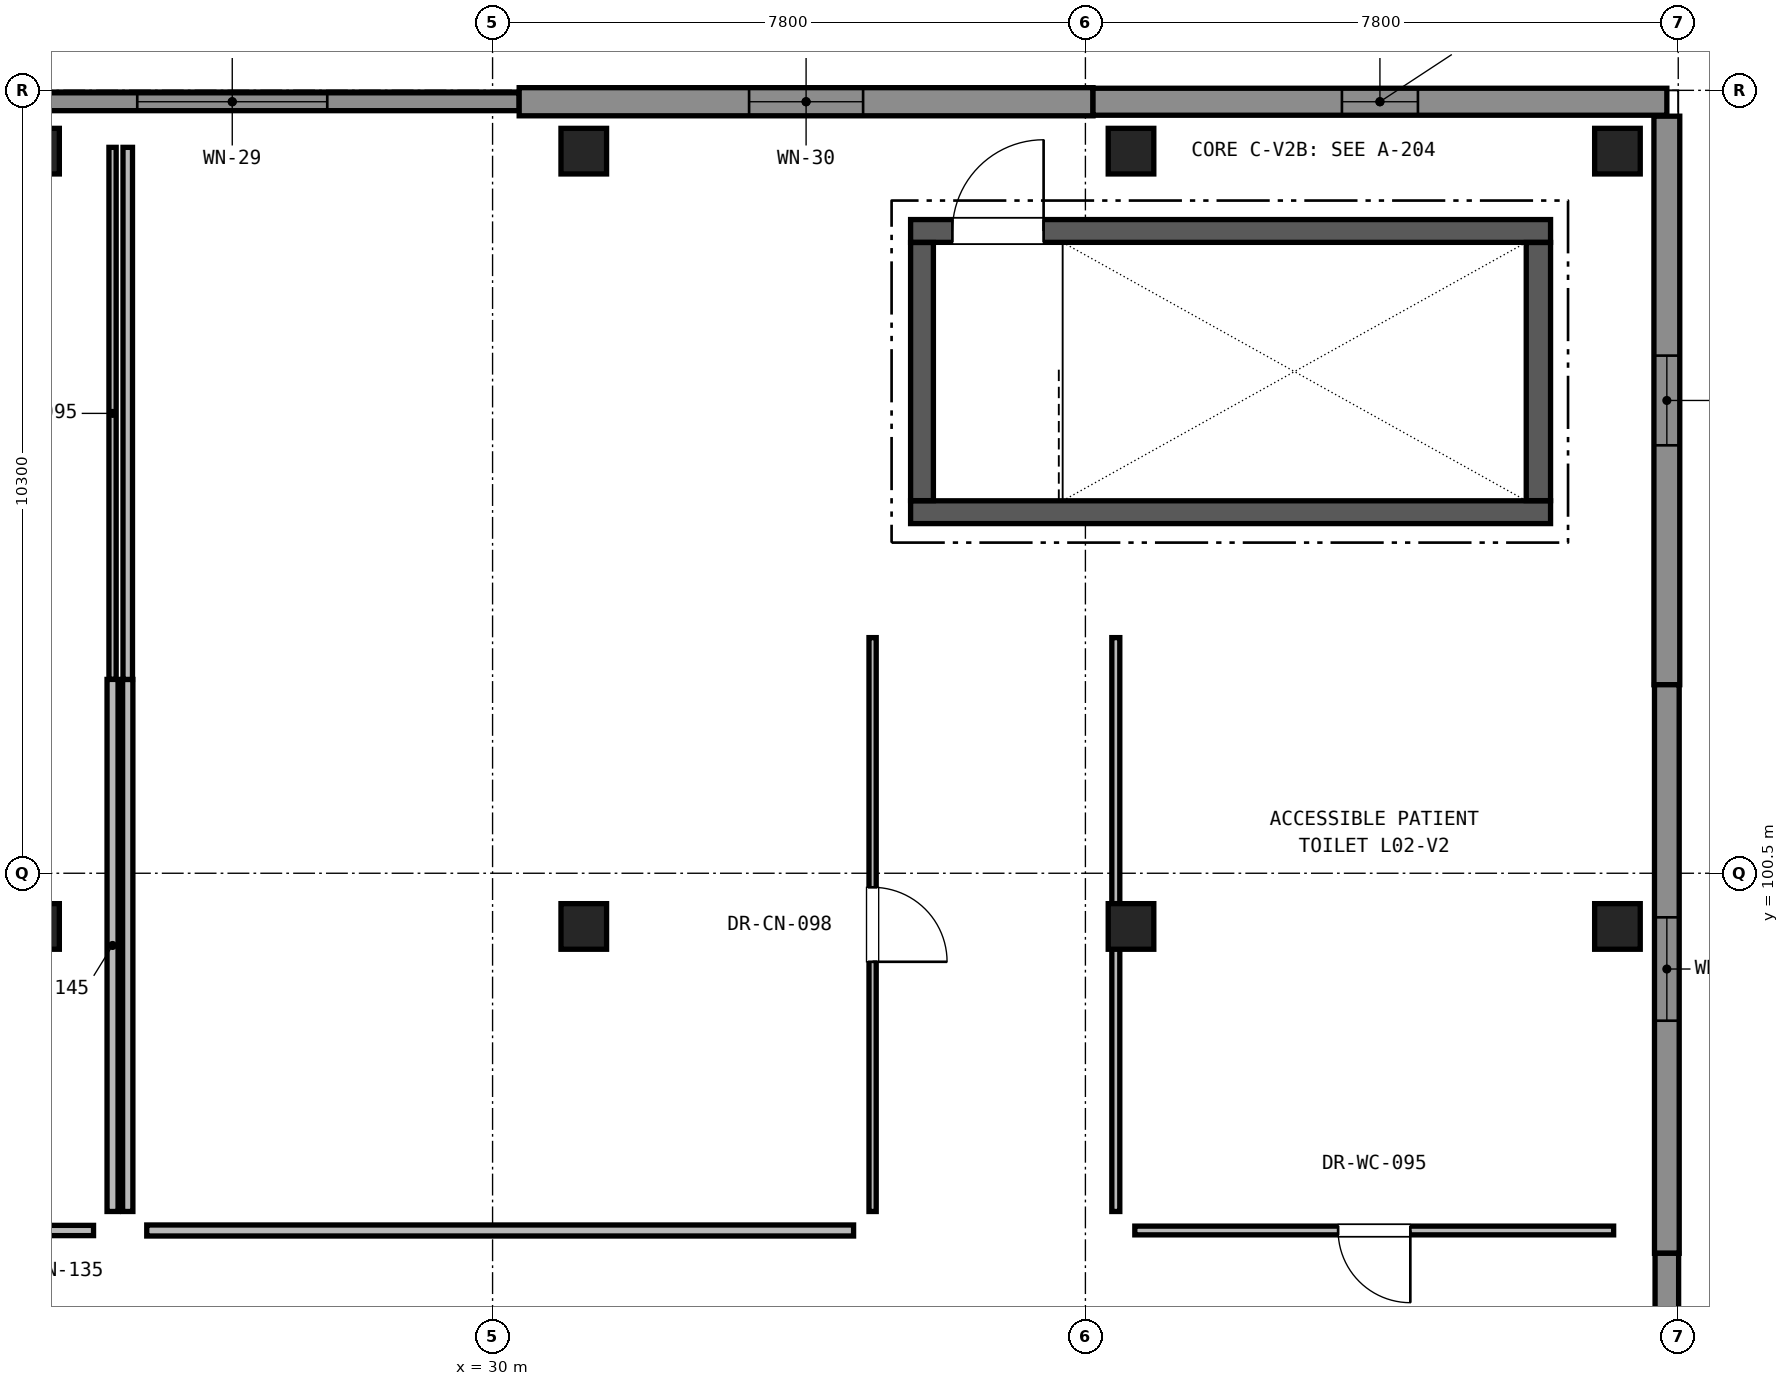
"""IFC4 building model, lengths in metres.
Left out: names, types, materials, properties, quantities, classifications, styles, units other than length and angle.
Written with IfcOpenShell. Run it as: python <this file> out.ifc"""

import sys

from ifc_helpers import new_model, si_unit, direction, frame, frame_2d, origin, origin_2d, place, context, subcontext, project, spatial, rectangle, extrude, element, fill, save


model = new_model("IFC4")
c1 = context("Model", 3, precision=1e-05, world=origin(), true_north=direction((0.0, 1.0)))
c2 = subcontext(c1, "Body", "Model", "MODEL_VIEW")
j1 = project(units=[si_unit("LENGTHUNIT", "METRE"), si_unit("PLANEANGLEUNIT", "RADIAN")], contexts=[c1])
p1 = place(None, origin())
s1 = spatial("IfcSite", under=j1, at=p1, CompositionType="ELEMENT")
p2 = place(p1, origin())
s2 = spatial("IfcBuilding", under=s1, at=p2, CompositionType="ELEMENT")
p3 = place(p2, frame((0.0, 0.0, 9.52)))
s3 = spatial("IfcBuildingStorey", under=s2, at=p3, CompositionType="ELEMENT", Elevation=9.52)
for number, where, z_axis, x_axis in (
    (1, (24.0, 99.8, 0.0), (0.0, 0.0, 1.0), (1.0, 0.0, 0.0)),
    (2, (24.0, 110.0, 0.0), (0.0, 0.0, 1.0), (1.0, 0.0, 0.0)),
    (3, (31.2, 99.8, 0.0), (0.0, 0.0, 1.0), (1.0, 0.0, 0.0)),
    (4, (31.2, 110.0, 0.0), (0.0, 0.0, 1.0), (1.0, 0.0, 0.0)),
    (5, (38.4, 99.8, 0.0), (0.0, 0.0, 1.0), (1.0, 0.0, 0.0)),
    (6, (38.4, 110.0, 0.0), (0.0, 0.0, 1.0), (1.0, 0.0, 0.0)),
    (7, (44.8, 99.8, 0.0), (0.0, 0.0, 1.0), (1.0, 0.0, 0.0)),
    (8, (44.8, 110.0, 0.0), (0.0, 0.0, 1.0), (1.0, 0.0, 0.0)),
):
    element("IfcColumn", number, at=place(p3, frame(where, z_axis=z_axis, x_axis=x_axis)), inside=s3, PredefinedType="COLUMN", context=c2, shape_type="SweptSolid", body=[
        extrude(rectangle(XDim=0.6, YDim=0.6, at=origin_2d()), origin(), (0.0, 0.0, 1.0), 4.08),
    ])
p4 = place(p3, frame((22.8, 110.65, 0.0), z_axis=(0.0, 0.0, 1.0), x_axis=(1.0, 0.0, 0.0)))
e9 = element("IfcWall", 9, at=p4, inside=s3, PredefinedType="SOLIDWALL", context=c2, shape_type="SweptSolid", body=[
    extrude(rectangle(XDim=7.55, YDim=0.235, at=frame_2d((3.775, 0.0))), origin(), (0.0, 0.0, 1.0), 3.843),
])
p5 = place(p4, frame((2.525, 0.0, 0.9)))
e10 = element("IfcOpeningElement", 10, at=p5, cuts=e9, PredefinedType="OPENING", context=c2, shape_type="SweptSolid", body=[
    extrude(rectangle(XDim=2.5, YDim=2.0, at=frame_2d((1.25, 1.0))), frame((0.0, 0.127, 0.0), z_axis=(0.0, -1.0, 0.0), x_axis=(1.0, 0.0, 0.0)), (0.0, 0.0, 1.0), 0.255),
])
p6 = place(p3, frame((30.35, 110.65, 0.0), z_axis=(0.0, 0.0, 1.0), x_axis=(1.0, 0.0, 0.0)))
e11 = element("IfcWall", 11, at=p6, inside=s3, PredefinedType="SOLIDWALL", context=c2, shape_type="SweptSolid", body=[
    extrude(rectangle(XDim=7.55, YDim=0.37, at=frame_2d((3.775, 0.0))), origin(), (0.0, 0.0, 1.0), 3.843),
])
p7 = place(p6, frame((3.025, 0.0, 0.9)))
e12 = element("IfcOpeningElement", 12, at=p7, cuts=e11, PredefinedType="OPENING", context=c2, shape_type="SweptSolid", body=[
    extrude(rectangle(XDim=1.5, YDim=2.2, at=frame_2d((0.75, 1.1))), frame((0.0, 0.195, 0.0), z_axis=(0.0, -1.0, 0.0), x_axis=(1.0, 0.0, 0.0)), (0.0, 0.0, 1.0), 0.39),
])
p8 = place(p3, frame((37.9, 110.65, 0.0), z_axis=(0.0, 0.0, 1.0), x_axis=(1.0, 0.0, 0.0)))
e13 = element("IfcWall", 13, at=p8, inside=s3, PredefinedType="SOLIDWALL", context=c2, shape_type="SweptSolid", body=[
    extrude(rectangle(XDim=7.55, YDim=0.355, at=frame_2d((3.775, 0.0))), origin(), (0.0, 0.0, 1.0), 3.843),
])
p9 = place(p8, frame((3.275, 0.0, 0.9)))
e14 = element("IfcOpeningElement", 14, at=p9, cuts=e13, PredefinedType="OPENING", context=c2, shape_type="SweptSolid", body=[
    extrude(rectangle(XDim=1.0, YDim=1.62, at=frame_2d((0.5, 0.81))), frame((0.0, 0.188, 0.0), z_axis=(0.0, -1.0, 0.0), x_axis=(1.0, 0.0, 0.0)), (0.0, 0.0, 1.0), 0.375),
])
p10 = place(p3, frame((45.45, 110.46, 0.0), z_axis=(0.0, 0.0, 1.0), x_axis=(0.0, -1.0, 0.0)))
e15 = element("IfcWall", 15, at=p10, inside=s3, PredefinedType="SOLIDWALL", context=c2, shape_type="SweptSolid", body=[
    extrude(rectangle(XDim=7.48, YDim=0.34, at=frame_2d((3.74, 0.0))), origin(), (0.0, 0.0, 1.0), 3.843),
])
p11 = place(p10, frame((3.15, 0.0, 0.9)))
e16 = element("IfcOpeningElement", 16, at=p11, cuts=e15, PredefinedType="OPENING", context=c2, shape_type="SweptSolid", body=[
    extrude(rectangle(XDim=1.18, YDim=1.62, at=frame_2d((0.59, 0.81))), frame((0.0, 0.18, 0.0), z_axis=(0.0, -1.0, 0.0), x_axis=(1.0, 0.0, 0.0)), (0.0, 0.0, 1.0), 0.36),
])
p12 = place(p3, frame((45.45, 102.98, 0.0), z_axis=(0.0, 0.0, 1.0), x_axis=(0.0, -1.0, 0.0)))
e17 = element("IfcWall", 17, at=p12, inside=s3, PredefinedType="SOLIDWALL", context=c2, shape_type="SweptSolid", body=[
    extrude(rectangle(XDim=7.48, YDim=0.325, at=frame_2d((3.74, 0.0))), origin(), (0.0, 0.0, 1.0), 3.843),
])
p13 = place(p12, frame((3.06, 0.0, 0.9)))
e18 = element("IfcOpeningElement", 18, at=p13, cuts=e17, PredefinedType="OPENING", context=c2, shape_type="SweptSolid", body=[
    extrude(rectangle(XDim=1.36, YDim=1.62, at=frame_2d((0.68, 0.81))), frame((0.0, 0.172, 0.0), z_axis=(0.0, -1.0, 0.0), x_axis=(1.0, 0.0, 0.0)), (0.0, 0.0, 1.0), 0.345),
])
p14 = place(p3, frame((45.45, 95.5, 0.0), z_axis=(0.0, 0.0, 1.0), x_axis=(0.0, -1.0, 0.0)))
e19 = element("IfcWall", 19, at=p14, inside=s3, PredefinedType="SOLIDWALL", context=c2, shape_type="SweptSolid", body=[
    extrude(rectangle(XDim=7.48, YDim=0.31, at=frame_2d((3.74, 0.0))), origin(), (0.0, 0.0, 1.0), 3.843),
])
p15 = place(p14, frame((2.97, 0.0, 0.9)))
e20 = element("IfcOpeningElement", 20, at=p15, cuts=e19, PredefinedType="OPENING", context=c2, shape_type="SweptSolid", body=[
    extrude(rectangle(XDim=1.54, YDim=1.62, at=frame_2d((0.77, 0.81))), frame((0.0, 0.165, 0.0), z_axis=(0.0, -1.0, 0.0), x_axis=(1.0, 0.0, 0.0)), (0.0, 0.0, 1.0), 0.33),
])
p16 = place(p3, frame((35.5, 105.25, 0.0), z_axis=(0.0, 0.0, 1.0), x_axis=(1.0, 0.0, 0.0)))
e21 = element("IfcWall", 21, at=p16, inside=s3, PredefinedType="SHEAR", context=c2, shape_type="SweptSolid", body=[
    extrude(rectangle(XDim=8.42, YDim=0.3, at=frame_2d((4.21, 0.0))), origin(), (0.0, 0.0, 1.0), 3.843),
])
p17 = place(p3, frame((35.5, 108.95, 0.0), z_axis=(0.0, 0.0, 1.0), x_axis=(1.0, 0.0, 0.0)))
e22 = element("IfcWall", 22, at=p17, inside=s3, PredefinedType="SHEAR", context=c2, shape_type="SweptSolid", body=[
    extrude(rectangle(XDim=8.42, YDim=0.3, at=frame_2d((4.21, 0.0))), origin(), (0.0, 0.0, 1.0), 3.843),
])
p18 = place(p17, frame((0.55, 0.0, 0.0)))
e23 = element("IfcOpeningElement", 23, at=p18, cuts=e22, PredefinedType="OPENING", context=c2, shape_type="SweptSolid", body=[
    extrude(rectangle(XDim=1.2, YDim=2.2, at=frame_2d((0.6, 1.1))), frame((0.0, 0.16, 0.0), z_axis=(0.0, -1.0, 0.0), x_axis=(1.0, 0.0, 0.0)), (0.0, 0.0, 1.0), 0.32),
])
p19 = place(p3, frame((35.65, 105.402, 0.0), z_axis=(0.0, 0.0, 1.0), x_axis=(0.0, 1.0, 0.0)))
e24 = element("IfcWall", 24, at=p19, inside=s3, PredefinedType="SHEAR", context=c2, shape_type="SweptSolid", body=[
    extrude(rectangle(XDim=3.396, YDim=0.3, at=frame_2d((1.698, 0.0))), origin(), (0.0, 0.0, 1.0), 3.843),
])
p20 = place(p3, frame((43.76, 105.402, 0.0), z_axis=(0.0, 0.0, 1.0), x_axis=(0.0, 1.0, 0.0)))
e25 = element("IfcWall", 25, at=p20, inside=s3, PredefinedType="SHEAR", context=c2, shape_type="SweptSolid", body=[
    extrude(rectangle(XDim=3.396, YDim=0.32, at=frame_2d((1.698, 0.0))), origin(), (0.0, 0.0, 1.0), 3.843),
])
p21 = place(p3, frame((25.0, 110.05, 0.0), z_axis=(0.0, 0.0, 1.0), x_axis=(0.0, -1.0, 0.0)))
e26 = element("IfcWall", 26, at=p21, inside=s3, PredefinedType="PARTITIONING", context=c2, shape_type="SweptSolid", body=[
    extrude(rectangle(XDim=7.0, YDim=0.095, at=frame_2d((3.5, 0.0))), origin(), (0.0, 0.0, 1.0), 3.143),
])
p22 = place(p3, frame((25.0, 103.05, 0.0), z_axis=(0.0, 0.0, 1.0), x_axis=(0.0, -1.0, 0.0)))
e27 = element("IfcWall", 27, at=p22, inside=s3, PredefinedType="PARTITIONING", context=c2, shape_type="SweptSolid", body=[
    extrude(rectangle(XDim=7.0, YDim=0.145, at=frame_2d((3.5, 0.0))), origin(), (0.0, 0.0, 1.0), 3.043),
])
p23 = place(p3, frame((24.75, 95.8, 0.0), z_axis=(0.0, 0.0, 1.0), x_axis=(-1.0, 0.0, 0.0)))
e28 = element("IfcWall", 28, at=p23, inside=s3, PredefinedType="PARTITIONING", context=c2, shape_type="SweptSolid", body=[
    extrude(rectangle(XDim=5.925, YDim=0.135, at=frame_2d((2.962, 0.0))), origin(), (0.0, 0.0, 1.0), 3.143),
])
p24 = place(p23, frame((2.433, 0.0, 0.0)))
e29 = element("IfcOpeningElement", 29, at=p24, cuts=e28, PredefinedType="OPENING", context=c2, shape_type="SweptSolid", body=[
    extrude(rectangle(XDim=1.06, YDim=2.15, at=frame_2d((0.53, 1.075))), frame((0.0, 0.077, 0.0), z_axis=(0.0, -1.0, 0.0), x_axis=(1.0, 0.0, 0.0)), (0.0, 0.0, 1.0), 0.155),
])
p25 = place(p3, frame((35.0, 103.6, 0.0), z_axis=(0.0, 0.0, 1.0), x_axis=(0.0, -1.0, 0.0)))
e30 = element("IfcWall", 30, at=p25, inside=s3, PredefinedType="PARTITIONING", context=c2, shape_type="SweptSolid", body=[
    extrude(rectangle(XDim=7.55, YDim=0.095, at=frame_2d((3.775, 0.0))), origin(), (0.0, 0.0, 1.0), 3.293),
])
p26 = place(p25, frame((3.285, 0.0, 0.0)))
e31 = element("IfcOpeningElement", 31, at=p26, cuts=e30, PredefinedType="OPENING", context=c2, shape_type="SweptSolid", body=[
    extrude(rectangle(XDim=0.98, YDim=2.15, at=frame_2d((0.49, 1.075))), frame((0.0, 0.057, 0.0), z_axis=(0.0, -1.0, 0.0), x_axis=(1.0, 0.0, 0.0)), (0.0, 0.0, 1.0), 0.115),
])
p27 = place(p3, frame((34.75, 95.8, 0.0), z_axis=(0.0, 0.0, 1.0), x_axis=(-1.0, 0.0, 0.0)))
e32 = element("IfcWall", 32, at=p27, inside=s3, PredefinedType="PARTITIONING", context=c2, shape_type="SweptSolid", body=[
    extrude(rectangle(XDim=9.3, YDim=0.145, at=frame_2d((4.65, 0.0))), origin(), (0.0, 0.0, 1.0), 3.293),
])
p28 = place(p3, frame((25.2, 96.05, 0.0), z_axis=(0.0, 0.0, 1.0), x_axis=(0.0, 1.0, 0.0)))
e33 = element("IfcWall", 33, at=p28, inside=s3, PredefinedType="PARTITIONING", context=c2, shape_type="SweptSolid", body=[
    extrude(rectangle(XDim=7.0, YDim=0.135, at=frame_2d((3.5, 0.0))), origin(), (0.0, 0.0, 1.0), 3.043),
])
p29 = place(p3, frame((25.2, 103.05, 0.0), z_axis=(0.0, 0.0, 1.0), x_axis=(0.0, 1.0, 0.0)))
e34 = element("IfcWall", 34, at=p29, inside=s3, PredefinedType="PARTITIONING", context=c2, shape_type="SweptSolid", body=[
    extrude(rectangle(XDim=7.0, YDim=0.125, at=frame_2d((3.5, 0.0))), origin(), (0.0, 0.0, 1.0), 3.143),
])
p30 = place(p3, frame((44.75, 95.8, 0.0), z_axis=(0.0, 0.0, 1.0), x_axis=(-1.0, 0.0, 0.0)))
e35 = element("IfcWall", 35, at=p30, inside=s3, PredefinedType="PARTITIONING", context=c2, shape_type="SweptSolid", body=[
    extrude(rectangle(XDim=6.3, YDim=0.115, at=frame_2d((3.15, 0.0))), origin(), (0.0, 0.0, 1.0), 3.043),
])
p31 = place(p30, frame((2.675, 0.0, 0.0)))
e36 = element("IfcOpeningElement", 36, at=p31, cuts=e35, PredefinedType="OPENING", context=c2, shape_type="SweptSolid", body=[
    extrude(rectangle(XDim=0.95, YDim=2.15, at=frame_2d((0.475, 1.075))), frame((0.0, 0.067, 0.0), z_axis=(0.0, -1.0, 0.0), x_axis=(1.0, 0.0, 0.0)), (0.0, 0.0, 1.0), 0.135),
])
p32 = place(p3, frame((38.2, 96.05, 0.0), z_axis=(0.0, 0.0, 1.0), x_axis=(0.0, 1.0, 0.0)))
e37 = element("IfcWall", 37, at=p32, inside=s3, PredefinedType="PARTITIONING", context=c2, shape_type="SweptSolid", body=[
    extrude(rectangle(XDim=7.55, YDim=0.105, at=frame_2d((3.775, 0.0))), origin(), (0.0, 0.0, 1.0), 3.143),
])
p33 = place(p5, origin())
e38 = element("IfcWindow", 38, at=p33, inside=s3, PartitioningType="SINGLE_PANEL", PredefinedType="WINDOW", context=c2, shape_type="SweptSolid", body=[
    extrude(rectangle(XDim=2.5, YDim=2.0, at=frame_2d((1.25, 1.0))), frame((0.0, 0.03, 0.0), z_axis=(0.0, -1.0, 0.0), x_axis=(1.0, 0.0, 0.0)), (0.0, 0.0, 1.0), 0.06),
])
fill(e10, e38)
p34 = place(p7, origin())
e39 = element("IfcWindow", 39, at=p34, inside=s3, PartitioningType="SINGLE_PANEL", PredefinedType="WINDOW", context=c2, shape_type="SweptSolid", body=[
    extrude(rectangle(XDim=1.5, YDim=2.2, at=frame_2d((0.75, 1.1))), frame((0.0, 0.03, 0.0), z_axis=(0.0, -1.0, 0.0), x_axis=(1.0, 0.0, 0.0)), (0.0, 0.0, 1.0), 0.06),
])
fill(e12, e39)
p35 = place(p9, origin())
e40 = element("IfcWindow", 40, at=p35, inside=s3, PartitioningType="SINGLE_PANEL", PredefinedType="WINDOW", context=c2, shape_type="SweptSolid", body=[
    extrude(rectangle(XDim=1.0, YDim=1.62, at=frame_2d((0.5, 0.81))), frame((0.0, 0.03, 0.0), z_axis=(0.0, -1.0, 0.0), x_axis=(1.0, 0.0, 0.0)), (0.0, 0.0, 1.0), 0.06),
])
fill(e14, e40)
p36 = place(p11, origin())
e41 = element("IfcWindow", 41, at=p36, inside=s3, PartitioningType="SINGLE_PANEL", PredefinedType="WINDOW", context=c2, shape_type="SweptSolid", body=[
    extrude(rectangle(XDim=1.18, YDim=1.62, at=frame_2d((0.59, 0.81))), frame((0.0, 0.03, 0.0), z_axis=(0.0, -1.0, 0.0), x_axis=(1.0, 0.0, 0.0)), (0.0, 0.0, 1.0), 0.06),
])
fill(e16, e41)
p37 = place(p13, origin())
e42 = element("IfcWindow", 42, at=p37, inside=s3, PartitioningType="SINGLE_PANEL", PredefinedType="WINDOW", context=c2, shape_type="SweptSolid", body=[
    extrude(rectangle(XDim=1.36, YDim=1.62, at=frame_2d((0.68, 0.81))), frame((0.0, 0.03, 0.0), z_axis=(0.0, -1.0, 0.0), x_axis=(1.0, 0.0, 0.0)), (0.0, 0.0, 1.0), 0.06),
])
fill(e18, e42)
p38 = place(p18, origin())
e43 = element("IfcDoor", 43, at=p38, inside=s3, OperationType="SINGLE_SWING_RIGHT", PredefinedType="DOOR", context=c2, shape_type="SweptSolid", body=[
    extrude(rectangle(XDim=1.2, YDim=2.2, at=frame_2d((0.6, 1.1))), frame((0.0, 0.025, 0.0), z_axis=(0.0, -1.0, 0.0), x_axis=(1.0, 0.0, 0.0)), (0.0, 0.0, 1.0), 0.05),
])
fill(e23, e43)
p39 = place(p26, origin())
e44 = element("IfcDoor", 44, at=p39, inside=s3, OperationType="SINGLE_SWING_RIGHT", PredefinedType="DOOR", context=c2, shape_type="SweptSolid", body=[
    extrude(rectangle(XDim=0.98, YDim=2.15, at=frame_2d((0.49, 1.075))), frame((0.0, 0.025, 0.0), z_axis=(0.0, -1.0, 0.0), x_axis=(1.0, 0.0, 0.0)), (0.0, 0.0, 1.0), 0.05),
])
fill(e31, e44)
p40 = place(p31, origin())
e45 = element("IfcDoor", 45, at=p40, inside=s3, OperationType="SINGLE_SWING_LEFT", PredefinedType="DOOR", context=c2, shape_type="SweptSolid", body=[
    extrude(rectangle(XDim=0.95, YDim=2.15, at=frame_2d((0.475, 1.075))), frame((0.0, 0.025, 0.0), z_axis=(0.0, -1.0, 0.0), x_axis=(1.0, 0.0, 0.0)), (0.0, 0.0, 1.0), 0.05),
])
fill(e36, e45)
save(model, sys.argv[1])
